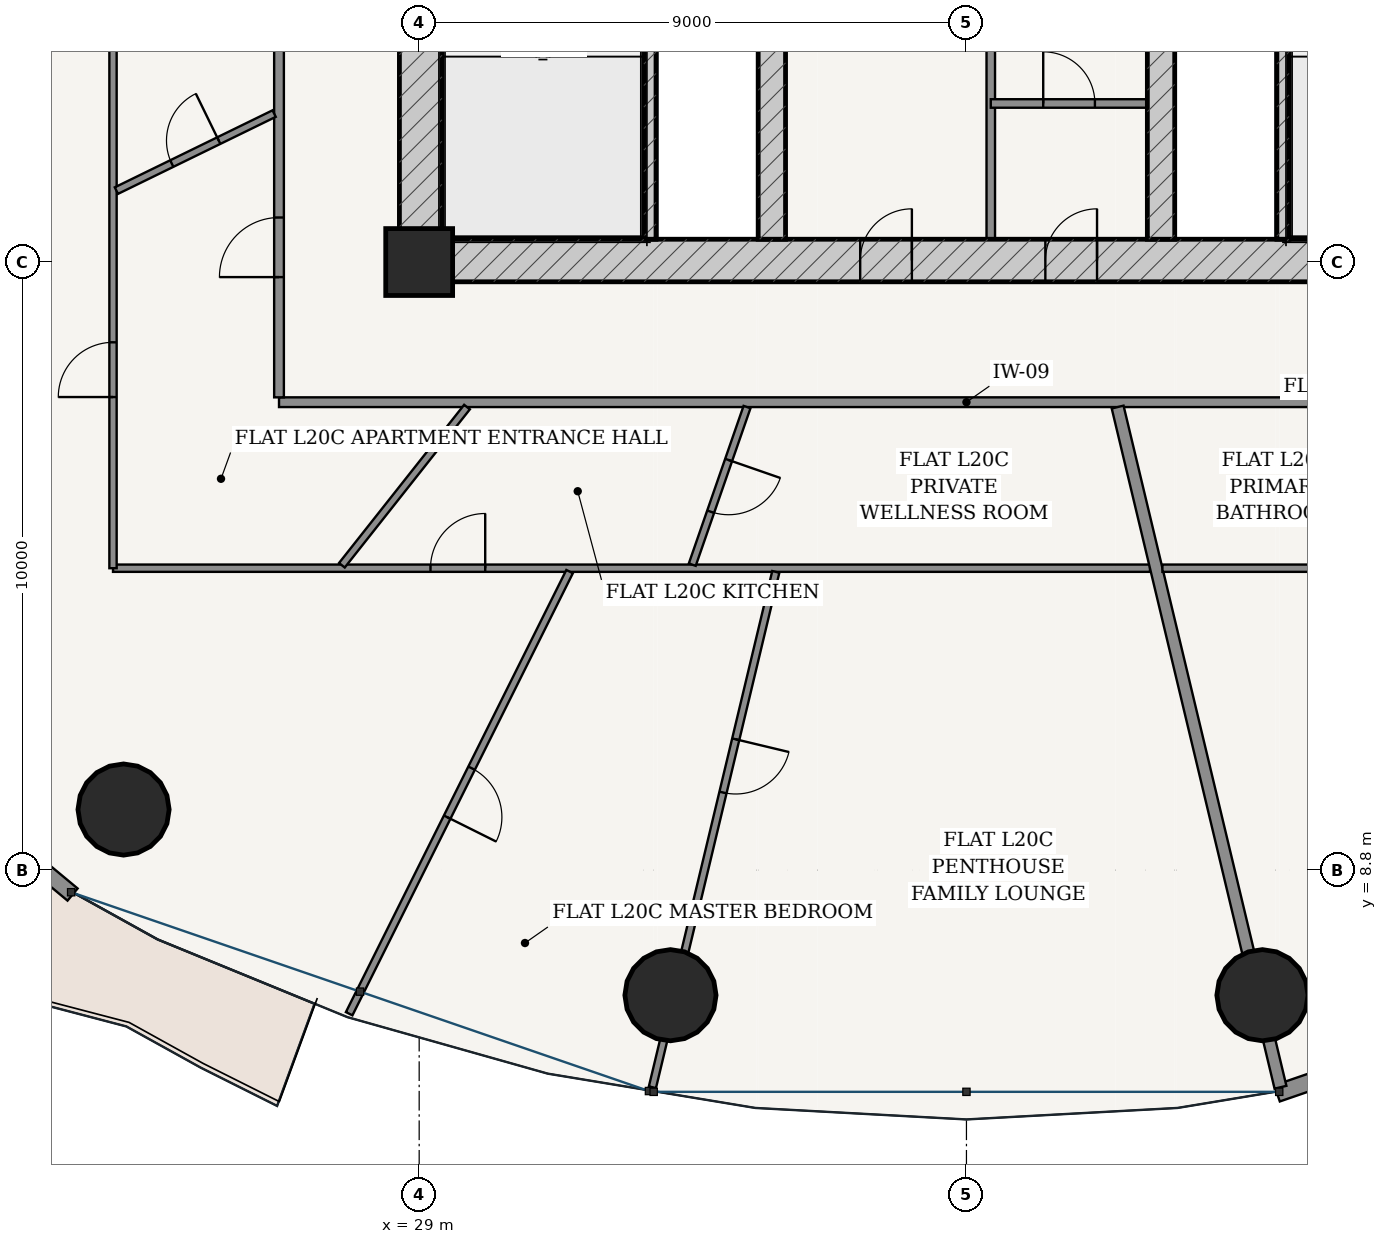
"""IFC4 building model, lengths in metres.
Left out: names, types, materials, properties, quantities, classifications, styles, units other than length and angle.
Written with IfcOpenShell. Run it as: python <this file> out.ifc"""

import sys

from ifc_helpers import new_model, si_unit, direction, frame, frame_2d, origin, origin_2d, place, context, subcontext, project, spatial, rectangle, hollow_circle, extrude, source, transform, mapped, element, fill, save


model = new_model("IFC4")
c1 = context("Model", 3, precision=1e-05, world=origin(), true_north=direction((-0.2419218956, 0.970295726276)))
c2 = subcontext(c1, "Body", "Model", "MODEL_VIEW")
j1 = project(units=[si_unit("LENGTHUNIT", "METRE"), si_unit("PLANEANGLEUNIT", "RADIAN")], contexts=[c1])
p1 = place(None, origin())
s1 = spatial("IfcSite", under=j1, at=p1, CompositionType="ELEMENT")
p2 = place(p1, origin())
s2 = spatial("IfcBuilding", under=s1, at=p2, CompositionType="ELEMENT")
p3 = place(p2, frame((0.0, 0.0, 79.8)))
s3 = spatial("IfcBuildingStorey", under=s2, at=p3, CompositionType="ELEMENT", Elevation=79.8)
p4 = place(p3, frame((29.0, 18.8, 0.0), z_axis=(0.0, 0.0, 1.0), x_axis=(1.0, 0.0, 0.0)))
e1 = element("IfcColumn", 1, at=p4, inside=s3, PredefinedType="COLUMN", context=c2, shape_type="SweptSolid", body=[
    extrude(rectangle(XDim=1.1, YDim=1.1, at=origin_2d()), origin(), (0.0, 0.0, 1.0), 3.6),
])
p5 = place(p3, frame((28.675, 18.825, 0.0), z_axis=(0.0, 0.0, 1.0), x_axis=(1.0, 0.0, 0.0)))
e2 = element("IfcWall", 2, at=p5, inside=s3, PredefinedType="SHEAR", context=c2, shape_type="SweptSolid", body=[
    extrude(rectangle(XDim=18.65, YDim=0.7, at=frame_2d((9.325, 0.0))), origin(), (0.0, 0.0, 1.0), 3.325),
])
p6 = place(p5, frame((7.577, 0.0, 0.0)))
e3 = element("IfcOpeningElement", 3, at=p6, cuts=e2, PredefinedType="OPENING", context=c2, shape_type="SweptSolid", body=[
    extrude(rectangle(XDim=0.85, YDim=2.1, at=frame_2d((0.425, 1.05))), frame((0.0, 0.36, 0.0), z_axis=(0.0, -1.0, 0.0), x_axis=(1.0, 0.0, 0.0)), (0.0, 0.0, 1.0), 0.72),
])
p7 = place(p5, frame((10.623, 0.0, 0.0)))
e4 = element("IfcOpeningElement", 4, at=p7, cuts=e2, PredefinedType="OPENING", context=c2, shape_type="SweptSolid", body=[
    extrude(rectangle(XDim=0.85, YDim=2.1, at=frame_2d((0.425, 1.05))), frame((0.0, 0.36, 0.0), z_axis=(0.0, -1.0, 0.0), x_axis=(1.0, 0.0, 0.0)), (0.0, 0.0, 1.0), 0.72),
])
p8 = place(p3, frame((29.025, 19.175, 0.0), z_axis=(0.0, 0.0, 1.0), x_axis=(0.0, 1.0, 0.0)))
e5 = element("IfcWall", 5, at=p8, inside=s3, PredefinedType="SHEAR", context=c2, shape_type="SweptSolid", body=[
    extrude(rectangle(XDim=15.25, YDim=0.7, at=frame_2d((7.625, 0.0))), origin(), (0.0, 0.0, 1.0), 3.325),
])
p9 = place(p8, frame((9.875, 0.0, 0.0)))
e6 = element("IfcOpeningElement", 6, at=p9, cuts=e5, PredefinedType="OPENING", context=c2, shape_type="SweptSolid", body=[
    extrude(rectangle(XDim=1.5, YDim=2.2, at=frame_2d((0.75, 1.1))), frame((0.0, 0.36, 0.0), z_axis=(0.0, -1.0, 0.0), x_axis=(1.0, 0.0, 0.0)), (0.0, 0.0, 1.0), 0.72),
])
for number, where, z_axis, x_axis in (
    (7, (32.795, 19.175, 0.0), (0.0, 0.0, 1.0), (0.0, 1.0, 0.0)),
    (8, (43.205, 19.175, 0.0), (0.0, 0.0, 1.0), (0.0, 1.0, 0.0)),
):
    element("IfcWall", number, at=place(p3, frame(where, z_axis=z_axis, x_axis=x_axis)), inside=s3, PredefinedType="SOLIDWALL", context=c2, shape_type="SweptSolid", body=[
        extrude(rectangle(XDim=7.375, YDim=0.2, at=frame_2d((3.688, 0.0))), origin(), (0.0, 0.0, 1.0), 3.325),
    ])
p10 = place(p3, frame((34.8, 19.175, 0.0), z_axis=(0.0, 0.0, 1.0), x_axis=(0.0, 1.0, 0.0)))
e9 = element("IfcWall", 9, at=p10, inside=s3, PredefinedType="SHEAR", context=c2, shape_type="SweptSolid", body=[
    extrude(rectangle(XDim=15.25, YDim=0.45, at=frame_2d((7.625, 0.0))), origin(), (0.0, 0.0, 1.0), 3.325),
])
p11 = place(p10, frame((7.8, 0.0, 0.0)))
e10 = element("IfcOpeningElement", 10, at=p11, cuts=e9, PredefinedType="OPENING", context=c2, shape_type="SweptSolid", body=[
    extrude(rectangle(XDim=1.05, YDim=2.15, at=frame_2d((0.525, 1.075))), frame((0.0, 0.235, 0.0), z_axis=(0.0, -1.0, 0.0), x_axis=(1.0, 0.0, 0.0)), (0.0, 0.0, 1.0), 0.47),
])
p12 = place(p3, frame((41.2, 19.175, 0.0), z_axis=(0.0, 0.0, 1.0), x_axis=(0.0, 1.0, 0.0)))
e11 = element("IfcWall", 11, at=p12, inside=s3, PredefinedType="SHEAR", context=c2, shape_type="SweptSolid", body=[
    extrude(rectangle(XDim=15.25, YDim=0.45, at=frame_2d((7.625, 0.0))), origin(), (0.0, 0.0, 1.0), 3.325),
])
p13 = place(p12, frame((7.8, 0.0, 0.0)))
e12 = element("IfcOpeningElement", 12, at=p13, cuts=e11, PredefinedType="OPENING", context=c2, shape_type="SweptSolid", body=[
    extrude(rectangle(XDim=1.05, YDim=2.15, at=frame_2d((0.525, 1.075))), frame((0.0, 0.235, 0.0), z_axis=(0.0, -1.0, 0.0), x_axis=(1.0, 0.0, 0.0)), (0.0, 0.0, 1.0), 0.47),
])
for number, where, z_axis, x_axis in (
    (13, (24.138, 9.796, 0.0), (0.0, 0.0, 1.0), (1.0, 0.0, 0.0)),
    (14, (33.133, 6.743, 0.0), (0.0, 0.0, 1.0), (1.0, 0.0, 0.0)),
    (15, (42.867, 6.743, 0.0), (0.0, 0.0, 1.0), (1.0, 0.0, 0.0)),
):
    element("IfcColumn", number, at=place(p3, frame(where, z_axis=z_axis, x_axis=x_axis)), inside=s3, PredefinedType="COLUMN", context=c2, shape_type="SweptSolid", body=[
        extrude(hollow_circle(Radius=0.75, WallThickness=0.045, at=origin_2d()), origin(), (0.0, 0.0, 1.0), 3.6),
    ])
p14 = place(p3, frame((15.846, 14.59, 0.0), z_axis=(0.0, 0.0, 1.0), x_axis=(0.769254958887, -0.638941944333, 0.0)))
e16 = element("IfcWall", 16, at=p14, inside=s3, PredefinedType="SOLIDWALL", context=c2, shape_type="SweptSolid", body=[
    extrude(rectangle(XDim=9.69, YDim=0.26, at=frame_2d((4.845, 0.0))), origin(), (0.0, 0.0, 1.0), 3.325),
])
p15 = place(p14, frame((4.17, 0.0, 0.0)))
e17 = element("IfcOpeningElement", 17, at=p15, cuts=e16, PredefinedType="OPENING", context=c2, shape_type="SweptSolid", body=[
    extrude(rectangle(XDim=1.35, YDim=2.2, at=frame_2d((0.675, 1.1))), frame((0.0, 0.14, 0.0), z_axis=(0.0, -1.0, 0.0), x_axis=(1.0, 0.0, 0.0)), (0.0, 0.0, 1.0), 0.28),
])
p16 = place(p3, frame((43.108, 5.128, 0.0), z_axis=(0.0, 0.0, 1.0), x_axis=(0.945590132341, 0.325360264351, 0.0)))
e18 = element("IfcWall", 18, at=p16, inside=s3, PredefinedType="SOLIDWALL", context=c2, shape_type="SweptSolid", body=[
    extrude(rectangle(XDim=10.289, YDim=0.28, at=frame_2d((5.145, 0.0))), origin(), (0.0, 0.0, 1.0), 3.325),
])
p17 = place(p16, frame((1.728, 0.0, 0.85)))
e19 = element("IfcOpeningElement", 19, at=p17, cuts=e18, PredefinedType="OPENING", context=c2, shape_type="SweptSolid", body=[
    extrude(rectangle(XDim=2.1, YDim=1.95, at=frame_2d((1.05, 0.975))), frame((0.0, 0.15, 0.0), z_axis=(0.0, -1.0, 0.0), x_axis=(1.0, 0.0, 0.0)), (0.0, 0.0, 1.0), 0.3),
])
p18 = place(p16, frame((6.461, 0.0, 0.85)))
e20 = element("IfcOpeningElement", 20, at=p18, cuts=e18, PredefinedType="OPENING", context=c2, shape_type="SweptSolid", body=[
    extrude(rectangle(XDim=2.1, YDim=1.95, at=frame_2d((1.05, 0.975))), frame((0.0, 0.15, 0.0), z_axis=(0.0, -1.0, 0.0), x_axis=(1.0, 0.0, 0.0)), (0.0, 0.0, 1.0), 0.3),
])
p19 = place(p3, frame((38.4, 19.175, 0.0), z_axis=(0.0, 0.0, 1.0), x_axis=(0.0, 1.0, 0.0)))
e21 = element("IfcWall", 21, at=p19, inside=s3, PredefinedType="PARTITIONING", context=c2, shape_type="SweptSolid", body=[
    extrude(rectangle(XDim=4.465, YDim=0.14, at=frame_2d((2.232, 0.0))), origin(), (0.0, 0.0, 1.0), 3.325),
])
p20 = place(p3, frame((38.4, 21.407, 0.0), z_axis=(0.0, 0.0, 1.0), x_axis=(1.0, 0.0, 0.0)))
e22 = element("IfcWall", 22, at=p20, inside=s3, PredefinedType="PARTITIONING", context=c2, shape_type="SweptSolid", body=[
    extrude(rectangle(XDim=2.575, YDim=0.14, at=frame_2d((1.288, 0.0))), origin(), (0.0, 0.0, 1.0), 3.325),
])
p21 = place(p20, frame((0.863, 0.0, 0.0)))
e23 = element("IfcOpeningElement", 23, at=p21, cuts=e22, PredefinedType="OPENING", context=c2, shape_type="SweptSolid", body=[
    extrude(rectangle(XDim=0.85, YDim=2.1, at=frame_2d((0.425, 1.05))), frame((0.0, 0.08, 0.0), z_axis=(0.0, -1.0, 0.0), x_axis=(1.0, 0.0, 0.0)), (0.0, 0.0, 1.0), 0.16),
])
p22 = place(p3, frame((26.695, 16.495, 0.0), z_axis=(0.0, 0.0, 1.0), x_axis=(1.0, 0.0, 0.0)))
e24 = element("IfcWall", 24, at=p22, inside=s3, PredefinedType="PARTITIONING", context=c2, shape_type="SweptSolid", body=[
    extrude(rectangle(XDim=22.61, YDim=0.16, at=frame_2d((11.305, 0.0))), origin(), (0.0, 0.0, 1.0), 2.767),
])
p23 = place(p3, frame((26.695, 16.575, 0.0), z_axis=(0.0, 0.0, 1.0), x_axis=(0.0, 1.0, 0.0)))
e25 = element("IfcWall", 25, at=p23, inside=s3, PredefinedType="PARTITIONING", context=c2, shape_type="SweptSolid", body=[
    extrude(rectangle(XDim=20.45, YDim=0.16, at=frame_2d((10.225, 0.0))), origin(), (0.0, 0.0, 1.0), 2.767),
])
p24 = place(p23, frame((1.977, 0.0, 0.0)))
e26 = element("IfcOpeningElement", 26, at=p24, cuts=e25, PredefinedType="OPENING", context=c2, shape_type="SweptSolid", body=[
    extrude(rectangle(XDim=0.98, YDim=2.2, at=frame_2d((0.49, 1.1))), frame((0.0, 0.09, 0.0), z_axis=(0.0, -1.0, 0.0), x_axis=(1.0, 0.0, 0.0)), (0.0, 0.0, 1.0), 0.18),
])
p25 = place(p3, frame((41.019, 13.765, 0.0), z_axis=(0.0, 0.0, 1.0), x_axis=(-1.0, 0.0, 0.0)))
e27 = element("IfcWall", 27, at=p25, inside=s3, PredefinedType="PARTITIONING", context=c2, shape_type="SweptSolid", body=[
    extrude(rectangle(XDim=17.054, YDim=0.12, at=frame_2d((8.527, 0.0))), origin(), (0.0, 0.0, 1.0), 2.767),
])
p26 = place(p25, frame((10.933, 0.0, 0.0)))
e28 = element("IfcOpeningElement", 28, at=p26, cuts=e27, PredefinedType="OPENING", context=c2, shape_type="SweptSolid", body=[
    extrude(rectangle(XDim=0.9, YDim=2.15, at=frame_2d((0.45, 1.075))), frame((0.0, 0.07, 0.0), z_axis=(0.0, -1.0, 0.0), x_axis=(1.0, 0.0, 0.0)), (0.0, 0.0, 1.0), 0.14),
])
p27 = place(p3, frame((23.965, 13.765, 0.0), z_axis=(0.0, 0.0, 1.0), x_axis=(0.0, 1.0, 0.0)))
e29 = element("IfcWall", 29, at=p27, inside=s3, PredefinedType="PARTITIONING", context=c2, shape_type="SweptSolid", body=[
    extrude(rectangle(XDim=10.614, YDim=0.12, at=frame_2d((5.307, 0.0))), origin(), (0.0, 0.0, 1.0), 2.767),
])
p28 = place(p27, frame((2.815, 0.0, 0.0)))
e30 = element("IfcOpeningElement", 30, at=p28, cuts=e29, PredefinedType="OPENING", context=c2, shape_type="SweptSolid", body=[
    extrude(rectangle(XDim=0.9, YDim=2.15, at=frame_2d((0.45, 1.075))), frame((0.0, 0.07, 0.0), z_axis=(0.0, -1.0, 0.0), x_axis=(1.0, 0.0, 0.0)), (0.0, 0.0, 1.0), 0.14),
])
p29 = place(p3, frame((31.474, 13.709, 0.0), z_axis=(0.0, 0.0, 1.0), x_axis=(-0.446179583353, -0.894943450392, 0.0)))
e31 = element("IfcWall", 31, at=p29, inside=s3, PredefinedType="PARTITIONING", context=c2, shape_type="SweptSolid", body=[
    extrude(rectangle(XDim=8.125, YDim=0.12, at=frame_2d((4.062, 0.0))), origin(), (0.0, 0.0, 1.0), 2.767),
])
p30 = place(p29, frame((3.612, 0.0, 0.0)))
e32 = element("IfcOpeningElement", 32, at=p30, cuts=e31, PredefinedType="OPENING", context=c2, shape_type="SweptSolid", body=[
    extrude(rectangle(XDim=0.9, YDim=2.15, at=frame_2d((0.45, 1.075))), frame((0.0, 0.07, 0.0), z_axis=(0.0, -1.0, 0.0), x_axis=(1.0, 0.0, 0.0)), (0.0, 0.0, 1.0), 0.14),
])
p31 = place(p3, frame((34.865, 13.705, 0.0), z_axis=(0.0, 0.0, 1.0), x_axis=(-0.23282725047, -0.97251810854, 0.0)))
e33 = element("IfcWall", 33, at=p31, inside=s3, PredefinedType="PARTITIONING", context=c2, shape_type="SweptSolid", body=[
    extrude(rectangle(XDim=8.715, YDim=0.12, at=frame_2d((4.357, 0.0))), origin(), (0.0, 0.0, 1.0), 2.767),
])
p32 = place(p31, frame((2.831, 0.0, 0.0)))
e34 = element("IfcOpeningElement", 34, at=p32, cuts=e33, PredefinedType="OPENING", context=c2, shape_type="SweptSolid", body=[
    extrude(rectangle(XDim=0.9, YDim=2.15, at=frame_2d((0.45, 1.075))), frame((0.0, 0.07, 0.0), z_axis=(0.0, -1.0, 0.0), x_axis=(1.0, 0.0, 0.0)), (0.0, 0.0, 1.0), 0.14),
])
p33 = place(p3, frame((26.615, 21.241, 0.0), z_axis=(0.0, 0.0, 1.0), x_axis=(-0.898615592274, -0.438736842906, 0.0)))
e35 = element("IfcWall", 35, at=p33, inside=s3, PredefinedType="PARTITIONING", context=c2, shape_type="SweptSolid", body=[
    extrude(rectangle(XDim=2.887, YDim=0.12, at=frame_2d((1.443, 0.0))), origin(), (0.0, 0.0, 1.0), 3.325),
])
p34 = place(p33, frame((1.013, 0.0, 0.0)))
e36 = element("IfcOpeningElement", 36, at=p34, cuts=e35, PredefinedType="OPENING", context=c2, shape_type="SweptSolid", body=[
    extrude(rectangle(XDim=0.86, YDim=2.15, at=frame_2d((0.43, 1.075))), frame((0.0, 0.07, 0.0), z_axis=(0.0, -1.0, 0.0), x_axis=(1.0, 0.0, 0.0)), (0.0, 0.0, 1.0), 0.14),
])
p35 = place(p3, frame((29.787, 16.415, 0.0), z_axis=(0.0, 0.0, 1.0), x_axis=(-0.62033143471, -0.784339793145, 0.0)))
e37 = element("IfcWall", 37, at=p35, inside=s3, PredefinedType="PARTITIONING", context=c2, shape_type="SweptSolid", body=[
    extrude(rectangle(XDim=3.317, YDim=0.12, at=frame_2d((1.658, 0.0))), origin(), (0.0, 0.0, 1.0), 3.004),
])
p36 = place(p3, frame((34.392, 16.415, 0.0), z_axis=(0.0, 0.0, 1.0), x_axis=(-0.328268661855, -0.94458439837, 0.0)))
e38 = element("IfcWall", 38, at=p36, inside=s3, PredefinedType="PARTITIONING", context=c2, shape_type="SweptSolid", body=[
    extrude(rectangle(XDim=2.744, YDim=0.12, at=frame_2d((1.372, 0.0))), origin(), (0.0, 0.0, 1.0), 3.325),
])
p37 = place(p36, frame((0.922, 0.0, 0.0)))
e39 = element("IfcOpeningElement", 39, at=p37, cuts=e38, PredefinedType="OPENING", context=c2, shape_type="SweptSolid", body=[
    extrude(rectangle(XDim=0.9, YDim=2.15, at=frame_2d((0.45, 1.075))), frame((0.0, 0.07, 0.0), z_axis=(0.0, -1.0, 0.0), x_axis=(1.0, 0.0, 0.0)), (0.0, 0.0, 1.0), 0.14),
])
p38 = place(p3, frame((40.486, 16.415, 0.0), z_axis=(0.0, 0.0, 1.0), x_axis=(0.232829417917, -0.972517589636, 0.0)))
e40 = element("IfcWall", 40, at=p38, inside=s3, PredefinedType="PARTITIONING", context=c2, shape_type="SweptSolid", body=[
    extrude(rectangle(XDim=11.502, YDim=0.2, at=frame_2d((5.751, 0.0))), origin(), (0.0, 0.0, 1.0), 2.767),
])
p39 = place(p3, frame((52.035, 13.765, 0.0), z_axis=(0.0, 0.0, 1.0), x_axis=(-1.0, 0.0, 0.0)))
e41 = element("IfcWall", 41, at=p39, inside=s3, PredefinedType="PARTITIONING", context=c2, shape_type="SweptSolid", body=[
    extrude(rectangle(XDim=10.812, YDim=0.12, at=frame_2d((5.406, 0.0))), origin(), (0.0, 0.0, 1.0), 2.767),
])
p40 = place(p39, frame((2.145, 0.0, 0.0)))
e42 = element("IfcOpeningElement", 42, at=p40, cuts=e41, PredefinedType="OPENING", context=c2, shape_type="SweptSolid", body=[
    extrude(rectangle(XDim=0.9, YDim=2.15, at=frame_2d((0.45, 1.075))), frame((0.0, 0.07, 0.0), z_axis=(0.0, -1.0, 0.0), x_axis=(1.0, 0.0, 0.0)), (0.0, 0.0, 1.0), 0.14),
])
m1 = source(origin(), c2, "Body", "SweptSolid", [
    extrude(rectangle(XDim=0.85, YDim=2.1, at=frame_2d((0.425, 1.05))), frame((0.0, 0.025, 0.0), z_axis=(0.0, -1.0, 0.0), x_axis=(1.0, 0.0, 0.0)), (0.0, 0.0, 1.0), 0.05),
])
p41 = place(p6, origin())
e43 = element("IfcDoor", 43, at=p41, inside=s3, OperationType="SINGLE_SWING_RIGHT", PredefinedType="DOOR", context=c2, shape_type="MappedRepresentation", body=[
    mapped(m1, transform((0.0, 0.0, 0.0), scale=1.0)),
])
fill(e3, e43)
p42 = place(p7, origin())
e44 = element("IfcDoor", 44, at=p42, inside=s3, OperationType="SINGLE_SWING_RIGHT", PredefinedType="DOOR", context=c2, shape_type="MappedRepresentation", body=[
    mapped(m1, transform((0.0, 0.0, 0.0), scale=1.0)),
])
fill(e4, e44)
p43 = place(p21, origin())
e45 = element("IfcDoor", 45, at=p43, inside=s3, OperationType="SINGLE_SWING_LEFT", PredefinedType="DOOR", context=c2, shape_type="MappedRepresentation", body=[
    mapped(m1, transform((0.0, 0.0, 0.0), scale=1.0)),
])
fill(e23, e45)
m2 = source(origin(), c2, "Body", "SweptSolid", [
    extrude(rectangle(XDim=0.98, YDim=2.2, at=frame_2d((0.49, 1.1))), frame((0.0, 0.025, 0.0), z_axis=(0.0, -1.0, 0.0), x_axis=(1.0, 0.0, 0.0)), (0.0, 0.0, 1.0), 0.05),
])
p44 = place(p24, origin())
e46 = element("IfcDoor", 46, at=p44, inside=s3, OperationType="SINGLE_SWING_LEFT", PredefinedType="DOOR", context=c2, shape_type="MappedRepresentation", body=[
    mapped(m2, transform((0.0, 0.0, 0.0), scale=1.0)),
])
fill(e26, e46)
m3 = source(origin(), c2, "Body", "SweptSolid", [
    extrude(rectangle(XDim=0.86, YDim=2.15, at=frame_2d((0.43, 1.075))), frame((0.0, 0.025, 0.0), z_axis=(0.0, -1.0, 0.0), x_axis=(1.0, 0.0, 0.0)), (0.0, 0.0, 1.0), 0.05),
])
p45 = place(p34, frame((0.86, 0.0, 0.0), z_axis=(0.0, 0.0, 1.0), x_axis=(-1.0, 0.0, 0.0)))
e47 = element("IfcDoor", 47, at=p45, inside=s3, OperationType="SINGLE_SWING_RIGHT", PredefinedType="DOOR", context=c2, shape_type="MappedRepresentation", body=[
    mapped(m3, transform((0.0, 0.0, 0.0), scale=1.0)),
])
fill(e36, e47)
m4 = source(origin(), c2, "Body", "SweptSolid", [
    extrude(rectangle(XDim=0.9, YDim=2.15, at=frame_2d((0.45, 1.075))), frame((0.0, 0.025, 0.0), z_axis=(0.0, -1.0, 0.0), x_axis=(1.0, 0.0, 0.0)), (0.0, 0.0, 1.0), 0.05),
])
p46 = place(p28, origin())
e48 = element("IfcDoor", 48, at=p46, inside=s3, OperationType="SINGLE_SWING_LEFT", PredefinedType="DOOR", context=c2, shape_type="MappedRepresentation", body=[
    mapped(m4, transform((0.0, 0.0, 0.0), scale=1.0)),
])
fill(e30, e48)
p47 = place(p26, frame((0.9, 0.0, 0.0), z_axis=(0.0, 0.0, 1.0), x_axis=(-1.0, 0.0, 0.0)))
e49 = element("IfcDoor", 49, at=p47, inside=s3, OperationType="SINGLE_SWING_RIGHT", PredefinedType="DOOR", context=c2, shape_type="MappedRepresentation", body=[
    mapped(m4, transform((0.0, 0.0, 0.0), scale=1.0)),
])
fill(e28, e49)
p48 = place(p37, origin())
e50 = element("IfcDoor", 50, at=p48, inside=s3, OperationType="SINGLE_SWING_LEFT", PredefinedType="DOOR", context=c2, shape_type="MappedRepresentation", body=[
    mapped(m4, transform((0.0, 0.0, 0.0), scale=1.0)),
])
fill(e39, e50)
p49 = place(p30, origin())
e51 = element("IfcDoor", 51, at=p49, inside=s3, OperationType="SINGLE_SWING_RIGHT", PredefinedType="DOOR", context=c2, shape_type="MappedRepresentation", body=[
    mapped(m4, transform((0.0, 0.0, 0.0), scale=1.0)),
])
fill(e32, e51)
p50 = place(p32, origin())
e52 = element("IfcDoor", 52, at=p50, inside=s3, OperationType="SINGLE_SWING_LEFT", PredefinedType="DOOR", context=c2, shape_type="MappedRepresentation", body=[
    mapped(m4, transform((0.0, 0.0, 0.0), scale=1.0)),
])
fill(e34, e52)
save(model, sys.argv[1])
